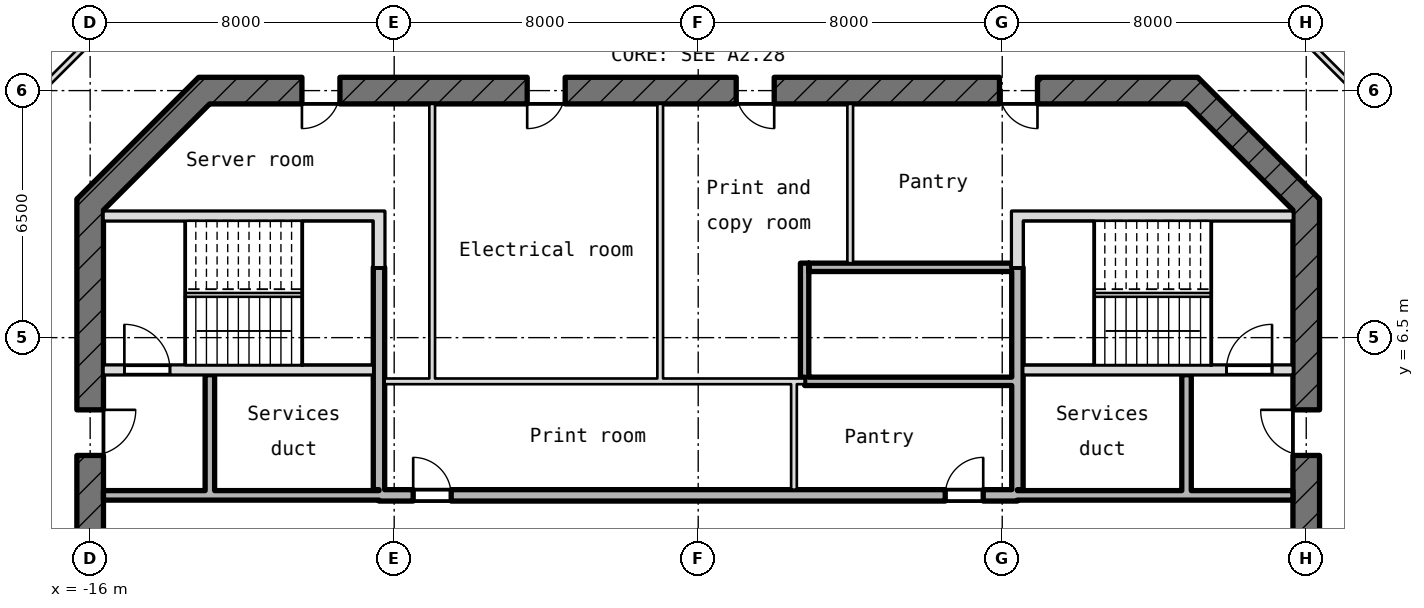
"""IFC4 building model, lengths in metres.
Left out: names, types, materials, properties, quantities, classifications, styles, units other than length and angle.
Written with IfcOpenShell. Run it as: python <this file> out.ifc"""

import sys

from ifc_helpers import new_model, si_unit, direction, frame, frame_2d, origin, place, context, subcontext, project, spatial, rectangle, extrude, element, fill, save


model = new_model("IFC4")
c1 = context("Model", 3, precision=1e-05, world=origin(), true_north=direction((0.0, 1.0)))
c2 = subcontext(c1, "Body", "Model", "MODEL_VIEW")
j1 = project(units=[si_unit("LENGTHUNIT", "METRE"), si_unit("PLANEANGLEUNIT", "RADIAN")], contexts=[c1])
p1 = place(None, origin())
s1 = spatial("IfcSite", under=j1, at=p1, CompositionType="ELEMENT")
p2 = place(p1, origin())
s2 = spatial("IfcBuilding", under=s1, at=p2, CompositionType="ELEMENT")
p3 = place(p2, frame((0.0, 0.0, 296.95)))
s3 = spatial("IfcBuildingStorey", under=s2, at=p3, CompositionType="ELEMENT", Elevation=296.95)
p4 = place(p3, frame((16.0, -10.145, -0.18), z_axis=(0.0, 0.0, 1.0), x_axis=(0.0, 1.0, 0.0)))
e1 = element("IfcWall", 1, at=p4, inside=s3, PredefinedType="SHEAR", context=c2, shape_type="SweptSolid", body=[
    extrude(rectangle(XDim=20.29, YDim=0.7, at=frame_2d((10.145, 0.0))), origin(), (0.0, 0.0, 1.0), 4.15),
])
p5 = place(p4, frame((8.945, 0.0, 0.18)))
e2 = element("IfcOpeningElement", 2, at=p5, cuts=e1, PredefinedType="OPENING", context=c2, shape_type="SweptSolid", body=[
    extrude(rectangle(XDim=2.4, YDim=2.1, at=frame_2d((1.2, 1.05))), frame((0.0, 0.36, 0.0), z_axis=(0.0, -1.0, 0.0), x_axis=(1.0, 0.0, 0.0)), (0.0, 0.0, 1.0), 0.72),
])
p6 = place(p4, frame((13.545, 0.0, 0.18)))
e3 = element("IfcOpeningElement", 3, at=p6, cuts=e1, PredefinedType="OPENING", context=c2, shape_type="SweptSolid", body=[
    extrude(rectangle(XDim=1.2, YDim=2.1, at=frame_2d((0.6, 1.05))), frame((0.0, 0.36, 0.0), z_axis=(0.0, -1.0, 0.0), x_axis=(1.0, 0.0, 0.0)), (0.0, 0.0, 1.0), 0.72),
])
p7 = place(p4, frame((2.4, 0.0, 0.18)))
e4 = element("IfcOpeningElement", 4, at=p7, cuts=e1, PredefinedType="OPENING", context=c2, shape_type="SweptSolid", body=[
    extrude(rectangle(XDim=1.2, YDim=2.1, at=frame_2d((0.6, 1.05))), frame((0.0, 0.36, 0.0), z_axis=(0.0, -1.0, 0.0), x_axis=(1.0, 0.0, 0.0)), (0.0, 0.0, 1.0), 0.72),
])
p8 = place(p3, frame((16.103, 9.897, -0.18), z_axis=(0.0, 0.0, 1.0), x_axis=(-0.707106781187, 0.707106781187, 0.0)))
e5 = element("IfcWall", 5, at=p8, inside=s3, PredefinedType="SHEAR", context=c2, shape_type="SweptSolid", body=[
    extrude(rectangle(XDim=4.533, YDim=0.7, at=frame_2d((2.266, 0.0))), origin(), (0.0, 0.0, 1.0), 4.15),
])
p9 = place(p3, frame((13.145, 13.0, -0.18), z_axis=(0.0, 0.0, 1.0), x_axis=(-1.0, 0.0, 0.0)))
e6 = element("IfcWall", 6, at=p9, inside=s3, PredefinedType="SHEAR", context=c2, shape_type="SweptSolid", body=[
    extrude(rectangle(XDim=26.29, YDim=0.7, at=frame_2d((13.145, 0.0))), origin(), (0.0, 0.0, 1.0), 4.15),
])
p10 = place(p9, frame((22.573, 0.0, 0.18)))
e7 = element("IfcOpeningElement", 7, at=p10, cuts=e6, PredefinedType="OPENING", context=c2, shape_type="SweptSolid", body=[
    extrude(rectangle(XDim=1.0, YDim=2.1, at=frame_2d((0.5, 1.05))), frame((0.0, 0.36, 0.0), z_axis=(0.0, -1.0, 0.0), x_axis=(1.0, 0.0, 0.0)), (0.0, 0.0, 1.0), 0.72),
])
p11 = place(p9, frame((16.645, 0.0, 0.18)))
e8 = element("IfcOpeningElement", 8, at=p11, cuts=e6, PredefinedType="OPENING", context=c2, shape_type="SweptSolid", body=[
    extrude(rectangle(XDim=1.0, YDim=2.1, at=frame_2d((0.5, 1.05))), frame((0.0, 0.36, 0.0), z_axis=(0.0, -1.0, 0.0), x_axis=(1.0, 0.0, 0.0)), (0.0, 0.0, 1.0), 0.72),
])
p12 = place(p9, frame((11.145, 0.0, 0.18)))
e9 = element("IfcOpeningElement", 9, at=p12, cuts=e6, PredefinedType="OPENING", context=c2, shape_type="SweptSolid", body=[
    extrude(rectangle(XDim=1.0, YDim=2.1, at=frame_2d((0.5, 1.05))), frame((0.0, 0.36, 0.0), z_axis=(0.0, -1.0, 0.0), x_axis=(1.0, 0.0, 0.0)), (0.0, 0.0, 1.0), 0.72),
])
p13 = place(p9, frame((4.217, 0.0, 0.18)))
e10 = element("IfcOpeningElement", 10, at=p13, cuts=e6, PredefinedType="OPENING", context=c2, shape_type="SweptSolid", body=[
    extrude(rectangle(XDim=1.0, YDim=2.1, at=frame_2d((0.5, 1.05))), frame((0.0, 0.36, 0.0), z_axis=(0.0, -1.0, 0.0), x_axis=(1.0, 0.0, 0.0)), (0.0, 0.0, 1.0), 0.72),
])
p14 = place(p3, frame((-12.897, 13.103, -0.18), z_axis=(0.0, 0.0, 1.0), x_axis=(-0.707106781187, -0.707106781187, 0.0)))
e11 = element("IfcWall", 11, at=p14, inside=s3, PredefinedType="SHEAR", context=c2, shape_type="SweptSolid", body=[
    extrude(rectangle(XDim=4.533, YDim=0.7, at=frame_2d((2.266, 0.0))), origin(), (0.0, 0.0, 1.0), 4.15),
])
p15 = place(p3, frame((-16.0, 10.145, -0.18), z_axis=(0.0, 0.0, 1.0), x_axis=(0.0, -1.0, 0.0)))
e12 = element("IfcWall", 12, at=p15, inside=s3, PredefinedType="SHEAR", context=c2, shape_type="SweptSolid", body=[
    extrude(rectangle(XDim=20.29, YDim=0.7, at=frame_2d((10.145, 0.0))), origin(), (0.0, 0.0, 1.0), 4.15),
])
p16 = place(p15, frame((8.945, 0.0, 0.18)))
e13 = element("IfcOpeningElement", 13, at=p16, cuts=e12, PredefinedType="OPENING", context=c2, shape_type="SweptSolid", body=[
    extrude(rectangle(XDim=2.4, YDim=2.1, at=frame_2d((1.2, 1.05))), frame((0.0, 0.36, 0.0), z_axis=(0.0, -1.0, 0.0), x_axis=(1.0, 0.0, 0.0)), (0.0, 0.0, 1.0), 0.72),
])
p17 = place(p15, frame((5.545, 0.0, 0.18)))
e14 = element("IfcOpeningElement", 14, at=p17, cuts=e12, PredefinedType="OPENING", context=c2, shape_type="SweptSolid", body=[
    extrude(rectangle(XDim=1.2, YDim=2.1, at=frame_2d((0.6, 1.05))), frame((0.0, 0.36, 0.0), z_axis=(0.0, -1.0, 0.0), x_axis=(1.0, 0.0, 0.0)), (0.0, 0.0, 1.0), 0.72),
])
p18 = place(p3, frame((-15.65, 2.35, 0.0), z_axis=(0.0, 0.0, 1.0), x_axis=(1.0, 0.0, 0.0)))
e15 = element("IfcWall", 15, at=p18, inside=s3, PredefinedType="STANDARD", context=c2, shape_type="SweptSolid", body=[
    extrude(rectangle(XDim=7.25, YDim=0.25, at=frame_2d((3.625, 0.0))), origin(), (0.0, 0.0, 1.0), 3.97),
])
p19 = place(p3, frame((-8.4, 2.35, -0.18), z_axis=(0.0, 0.0, 1.0), x_axis=(1.0, 0.0, 0.0)))
e16 = element("IfcWall", 16, at=p19, inside=s3, PredefinedType="SHEAR", context=c2, shape_type="SweptSolid", body=[
    extrude(rectangle(XDim=16.8, YDim=0.3, at=frame_2d((8.4, 0.0))), origin(), (0.0, 0.0, 1.0), 4.15),
])
p20 = place(p19, frame((0.9, 0.0, 0.18)))
e17 = element("IfcOpeningElement", 17, at=p20, cuts=e16, PredefinedType="OPENING", context=c2, shape_type="SweptSolid", body=[
    extrude(rectangle(XDim=1.0, YDim=2.1, at=frame_2d((0.5, 1.05))), frame((0.0, 0.16, 0.0), z_axis=(0.0, -1.0, 0.0), x_axis=(1.0, 0.0, 0.0)), (0.0, 0.0, 1.0), 0.32),
])
p21 = place(p19, frame((14.9, 0.0, 0.18)))
e18 = element("IfcOpeningElement", 18, at=p21, cuts=e16, PredefinedType="OPENING", context=c2, shape_type="SweptSolid", body=[
    extrude(rectangle(XDim=1.0, YDim=2.1, at=frame_2d((0.5, 1.05))), frame((0.0, 0.16, 0.0), z_axis=(0.0, -1.0, 0.0), x_axis=(1.0, 0.0, 0.0)), (0.0, 0.0, 1.0), 0.32),
])
p22 = place(p3, frame((8.4, 2.35, 0.0), z_axis=(0.0, 0.0, 1.0), x_axis=(1.0, 0.0, 0.0)))
e19 = element("IfcWall", 19, at=p22, inside=s3, PredefinedType="STANDARD", context=c2, shape_type="SweptSolid", body=[
    extrude(rectangle(XDim=7.25, YDim=0.25, at=frame_2d((3.625, 0.0))), origin(), (0.0, 0.0, 1.0), 3.97),
])
p23 = place(p3, frame((-8.25, 5.35, 0.0), z_axis=(0.0, 0.0, 1.0), x_axis=(1.0, 0.0, 0.0)))
e20 = element("IfcWall", 20, at=p23, inside=s3, PredefinedType="PARTITIONING", context=c2, shape_type="SweptSolid", body=[
    extrude(rectangle(XDim=11.05, YDim=0.15, at=frame_2d((5.525, 0.0))), origin(), (0.0, 0.0, 1.0), 3.97),
])
p24 = place(p3, frame((2.8, 5.35, 0.0), z_axis=(0.0, 0.0, 1.0), x_axis=(1.0, 0.0, 0.0)))
e21 = element("IfcWall", 21, at=p24, inside=s3, PredefinedType="STANDARD", context=c2, shape_type="SweptSolid", body=[
    extrude(rectangle(XDim=5.45, YDim=0.22, at=frame_2d((2.725, 0.0))), origin(), (0.0, 0.0, 1.0), 3.97),
])
p25 = place(p3, frame((-15.65, 5.65, -0.18), z_axis=(0.0, 0.0, 1.0), x_axis=(1.0, 0.0, 0.0)))
e22 = element("IfcWall", 22, at=p25, inside=s3, PredefinedType="SHEAR", context=c2, shape_type="SweptSolid", body=[
    extrude(rectangle(XDim=7.1, YDim=0.25, at=frame_2d((3.55, 0.0))), origin(), (0.0, 0.0, 1.0), 4.15),
])
p26 = place(p25, frame((0.55, 0.0, 0.18)))
e23 = element("IfcOpeningElement", 23, at=p26, cuts=e22, PredefinedType="OPENING", context=c2, shape_type="SweptSolid", body=[
    extrude(rectangle(XDim=1.2, YDim=2.1, at=frame_2d((0.6, 1.05))), frame((0.0, 0.135, 0.0), z_axis=(0.0, -1.0, 0.0), x_axis=(1.0, 0.0, 0.0)), (0.0, 0.0, 1.0), 0.27),
])
p27 = place(p3, frame((8.55, 5.65, -0.18), z_axis=(0.0, 0.0, 1.0), x_axis=(1.0, 0.0, 0.0)))
e24 = element("IfcWall", 24, at=p27, inside=s3, PredefinedType="SHEAR", context=c2, shape_type="SweptSolid", body=[
    extrude(rectangle(XDim=7.1, YDim=0.25, at=frame_2d((3.55, 0.0))), origin(), (0.0, 0.0, 1.0), 4.15),
])
p28 = place(p27, frame((5.35, 0.0, 0.18)))
e25 = element("IfcOpeningElement", 25, at=p28, cuts=e24, PredefinedType="OPENING", context=c2, shape_type="SweptSolid", body=[
    extrude(rectangle(XDim=1.2, YDim=2.1, at=frame_2d((0.6, 1.05))), frame((0.0, 0.135, 0.0), z_axis=(0.0, -1.0, 0.0), x_axis=(1.0, 0.0, 0.0)), (0.0, 0.0, 1.0), 0.27),
])
p29 = place(p3, frame((2.91, 8.35, 0.0), z_axis=(0.0, 0.0, 1.0), x_axis=(1.0, 0.0, 0.0)))
e26 = element("IfcWall", 26, at=p29, inside=s3, PredefinedType="STANDARD", context=c2, shape_type="SweptSolid", body=[
    extrude(rectangle(XDim=5.34, YDim=0.22, at=frame_2d((2.67, 0.0))), origin(), (0.0, 0.0, 1.0), 3.97),
])
for number, where, z_axis, x_axis in (
    (27, (-15.65, 9.7, -0.18), (0.0, 0.0, 1.0), (1.0, 0.0, 0.0)),
    (28, (8.55, 9.7, -0.18), (0.0, 0.0, 1.0), (1.0, 0.0, 0.0)),
):
    element("IfcWall", number, at=place(p3, frame(where, z_axis=z_axis, x_axis=x_axis)), inside=s3, PredefinedType="SHEAR", context=c2, shape_type="SweptSolid", body=[
        extrude(rectangle(XDim=7.1, YDim=0.25, at=frame_2d((3.55, 0.0))), origin(), (0.0, 0.0, 1.0), 4.15),
    ])
p30 = place(p3, frame((-12.85, 2.475, 0.0), z_axis=(0.0, 0.0, 1.0), x_axis=(0.0, 1.0, 0.0)))
e29 = element("IfcWall", 29, at=p30, inside=s3, PredefinedType="STANDARD", context=c2, shape_type="SweptSolid", body=[
    extrude(rectangle(XDim=3.05, YDim=0.25, at=frame_2d((1.525, 0.0))), origin(), (0.0, 0.0, 1.0), 3.97),
])
p31 = place(p3, frame((-8.4, 2.5, -0.18), z_axis=(0.0, 0.0, 1.0), x_axis=(0.0, 1.0, 0.0)))
e30 = element("IfcWall", 30, at=p31, inside=s3, PredefinedType="SHEAR", context=c2, shape_type="SweptSolid", body=[
    extrude(rectangle(XDim=5.85, YDim=0.3, at=frame_2d((2.925, 0.0))), origin(), (0.0, 0.0, 1.0), 4.15),
])
p32 = place(p3, frame((-8.4, 8.35, -0.18), z_axis=(0.0, 0.0, 1.0), x_axis=(0.0, 1.0, 0.0)))
e31 = element("IfcWall", 31, at=p32, inside=s3, PredefinedType="SHEAR", context=c2, shape_type="SweptSolid", body=[
    extrude(rectangle(XDim=1.475, YDim=0.3, at=frame_2d((0.737, 0.0))), origin(), (0.0, 0.0, 1.0), 4.15),
])
for number, where, z_axis, x_axis in (
    (32, (-7.0, 5.425, 0.0), (0.0, 0.0, 1.0), (0.0, 1.0, 0.0)),
    (33, (-1.0, 5.425, 0.0), (0.0, 0.0, 1.0), (0.0, 1.0, 0.0)),
):
    element("IfcWall", number, at=place(p3, frame(where, z_axis=z_axis, x_axis=x_axis)), inside=s3, PredefinedType="PARTITIONING", context=c2, shape_type="SweptSolid", body=[
        extrude(rectangle(XDim=7.225, YDim=0.15, at=frame_2d((3.612, 0.0))), origin(), (0.0, 0.0, 1.0), 3.97),
    ])
p33 = place(p3, frame((2.52, 2.5, 0.0), z_axis=(0.0, 0.0, 1.0), x_axis=(0.0, 1.0, 0.0)))
e34 = element("IfcWall", 34, at=p33, inside=s3, PredefinedType="PARTITIONING", context=c2, shape_type="SweptSolid", body=[
    extrude(rectangle(XDim=2.775, YDim=0.15, at=frame_2d((1.387, 0.0))), origin(), (0.0, 0.0, 1.0), 3.97),
])
p34 = place(p3, frame((2.8, 5.46, 0.0), z_axis=(0.0, 0.0, 1.0), x_axis=(0.0, 1.0, 0.0)))
e35 = element("IfcWall", 35, at=p34, inside=s3, PredefinedType="STANDARD", context=c2, shape_type="SweptSolid", body=[
    extrude(rectangle(XDim=3.0, YDim=0.22, at=frame_2d((1.5, 0.0))), origin(), (0.0, 0.0, 1.0), 3.97),
])
p35 = place(p3, frame((4.0, 8.46, 0.0), z_axis=(0.0, 0.0, 1.0), x_axis=(0.0, 1.0, 0.0)))
e36 = element("IfcWall", 36, at=p35, inside=s3, PredefinedType="PARTITIONING", context=c2, shape_type="SweptSolid", body=[
    extrude(rectangle(XDim=4.19, YDim=0.15, at=frame_2d((2.095, 0.0))), origin(), (0.0, 0.0, 1.0), 3.97),
])
p36 = place(p3, frame((8.4, 2.5, -0.18), z_axis=(0.0, 0.0, 1.0), x_axis=(0.0, 1.0, 0.0)))
e37 = element("IfcWall", 37, at=p36, inside=s3, PredefinedType="SHEAR", context=c2, shape_type="SweptSolid", body=[
    extrude(rectangle(XDim=5.85, YDim=0.3, at=frame_2d((2.925, 0.0))), origin(), (0.0, 0.0, 1.0), 4.15),
])
p37 = place(p3, frame((8.4, 8.35, -0.18), z_axis=(0.0, 0.0, 1.0), x_axis=(0.0, 1.0, 0.0)))
e38 = element("IfcWall", 38, at=p37, inside=s3, PredefinedType="SHEAR", context=c2, shape_type="SweptSolid", body=[
    extrude(rectangle(XDim=1.475, YDim=0.3, at=frame_2d((0.737, 0.0))), origin(), (0.0, 0.0, 1.0), 4.15),
])
p38 = place(p3, frame((12.85, 2.475, 0.0), z_axis=(0.0, 0.0, 1.0), x_axis=(0.0, 1.0, 0.0)))
e39 = element("IfcWall", 39, at=p38, inside=s3, PredefinedType="STANDARD", context=c2, shape_type="SweptSolid", body=[
    extrude(rectangle(XDim=3.05, YDim=0.25, at=frame_2d((1.525, 0.0))), origin(), (0.0, 0.0, 1.0), 3.97),
])
for number, where, z_axis, x_axis in (
    (40, (-19.05, 11.263, 0.0), (0.0, 0.0, 1.0), (0.707, 0.707, 0.0)),
    (41, (14.263, 16.05, 0.0), (0.0, 0.0, 1.0), (0.707, -0.707, 0.0)),
):
    element("IfcWall", number, at=place(p3, frame(where, z_axis=z_axis, x_axis=x_axis)), inside=s3, PredefinedType="PARTITIONING", context=c2, shape_type="SweptSolid", body=[
        extrude(rectangle(XDim=6.769, YDim=0.15, at=frame_2d((3.385, 0.0))), origin(), (0.0, 0.0, 1.0), 3.97),
    ])
p39 = place(p26, origin())
e42 = element("IfcDoor", 42, at=p39, inside=s3, OperationType="SINGLE_SWING_RIGHT", PredefinedType="DOOR", context=c2, shape_type="SweptSolid", body=[
    extrude(rectangle(XDim=1.2, YDim=2.1, at=frame_2d((0.6, 1.05))), frame((0.0, 0.025, 0.0), z_axis=(0.0, -1.0, 0.0), x_axis=(1.0, 0.0, 0.0)), (0.0, 0.0, 1.0), 0.05),
])
fill(e23, e42)
p40 = place(p28, origin())
e43 = element("IfcDoor", 43, at=p40, inside=s3, OperationType="SINGLE_SWING_RIGHT", PredefinedType="DOOR", context=c2, shape_type="SweptSolid", body=[
    extrude(rectangle(XDim=1.2, YDim=2.1, at=frame_2d((0.6, 1.05))), frame((0.0, 0.025, 0.0), z_axis=(0.0, -1.0, 0.0), x_axis=(1.0, 0.0, 0.0)), (0.0, 0.0, 1.0), 0.05),
])
fill(e25, e43)
p41 = place(p17, origin())
e44 = element("IfcDoor", 44, at=p41, inside=s3, OperationType="SINGLE_SWING_RIGHT", PredefinedType="DOOR", context=c2, shape_type="SweptSolid", body=[
    extrude(rectangle(XDim=1.2, YDim=2.1, at=frame_2d((0.6, 1.05))), frame((0.0, 0.025, 0.0), z_axis=(0.0, -1.0, 0.0), x_axis=(1.0, 0.0, 0.0)), (0.0, 0.0, 1.0), 0.05),
])
fill(e14, e44)
p42 = place(p6, origin())
e45 = element("IfcDoor", 45, at=p42, inside=s3, OperationType="SINGLE_SWING_RIGHT", PredefinedType="DOOR", context=c2, shape_type="SweptSolid", body=[
    extrude(rectangle(XDim=1.2, YDim=2.1, at=frame_2d((0.6, 1.05))), frame((0.0, 0.025, 0.0), z_axis=(0.0, -1.0, 0.0), x_axis=(1.0, 0.0, 0.0)), (0.0, 0.0, 1.0), 0.05),
])
fill(e3, e45)
p43 = place(p20, origin())
e46 = element("IfcDoor", 46, at=p43, inside=s3, OperationType="SINGLE_SWING_RIGHT", PredefinedType="DOOR", context=c2, shape_type="SweptSolid", body=[
    extrude(rectangle(XDim=1.0, YDim=2.1, at=frame_2d((0.5, 1.05))), frame((0.0, 0.025, 0.0), z_axis=(0.0, -1.0, 0.0), x_axis=(1.0, 0.0, 0.0)), (0.0, 0.0, 1.0), 0.05),
])
fill(e17, e46)
p44 = place(p21, origin())
e47 = element("IfcDoor", 47, at=p44, inside=s3, OperationType="SINGLE_SWING_RIGHT", PredefinedType="DOOR", context=c2, shape_type="SweptSolid", body=[
    extrude(rectangle(XDim=1.0, YDim=2.1, at=frame_2d((0.5, 1.05))), frame((0.0, 0.025, 0.0), z_axis=(0.0, -1.0, 0.0), x_axis=(1.0, 0.0, 0.0)), (0.0, 0.0, 1.0), 0.05),
])
fill(e18, e47)
p45 = place(p10, origin())
e48 = element("IfcDoor", 48, at=p45, inside=s3, OperationType="SINGLE_SWING_RIGHT", PredefinedType="DOOR", context=c2, shape_type="SweptSolid", body=[
    extrude(rectangle(XDim=1.0, YDim=2.1, at=frame_2d((0.5, 1.05))), frame((0.0, 0.025, 0.0), z_axis=(0.0, -1.0, 0.0), x_axis=(1.0, 0.0, 0.0)), (0.0, 0.0, 1.0), 0.05),
])
fill(e7, e48)
p46 = place(p11, origin())
e49 = element("IfcDoor", 49, at=p46, inside=s3, OperationType="SINGLE_SWING_RIGHT", PredefinedType="DOOR", context=c2, shape_type="SweptSolid", body=[
    extrude(rectangle(XDim=1.0, YDim=2.1, at=frame_2d((0.5, 1.05))), frame((0.0, 0.025, 0.0), z_axis=(0.0, -1.0, 0.0), x_axis=(1.0, 0.0, 0.0)), (0.0, 0.0, 1.0), 0.05),
])
fill(e8, e49)
p47 = place(p12, origin())
e50 = element("IfcDoor", 50, at=p47, inside=s3, OperationType="SINGLE_SWING_RIGHT", PredefinedType="DOOR", context=c2, shape_type="SweptSolid", body=[
    extrude(rectangle(XDim=1.0, YDim=2.1, at=frame_2d((0.5, 1.05))), frame((0.0, 0.025, 0.0), z_axis=(0.0, -1.0, 0.0), x_axis=(1.0, 0.0, 0.0)), (0.0, 0.0, 1.0), 0.05),
])
fill(e9, e50)
p48 = place(p13, origin())
e51 = element("IfcDoor", 51, at=p48, inside=s3, OperationType="SINGLE_SWING_RIGHT", PredefinedType="DOOR", context=c2, shape_type="SweptSolid", body=[
    extrude(rectangle(XDim=1.0, YDim=2.1, at=frame_2d((0.5, 1.05))), frame((0.0, 0.025, 0.0), z_axis=(0.0, -1.0, 0.0), x_axis=(1.0, 0.0, 0.0)), (0.0, 0.0, 1.0), 0.05),
])
fill(e10, e51)
save(model, sys.argv[1])
